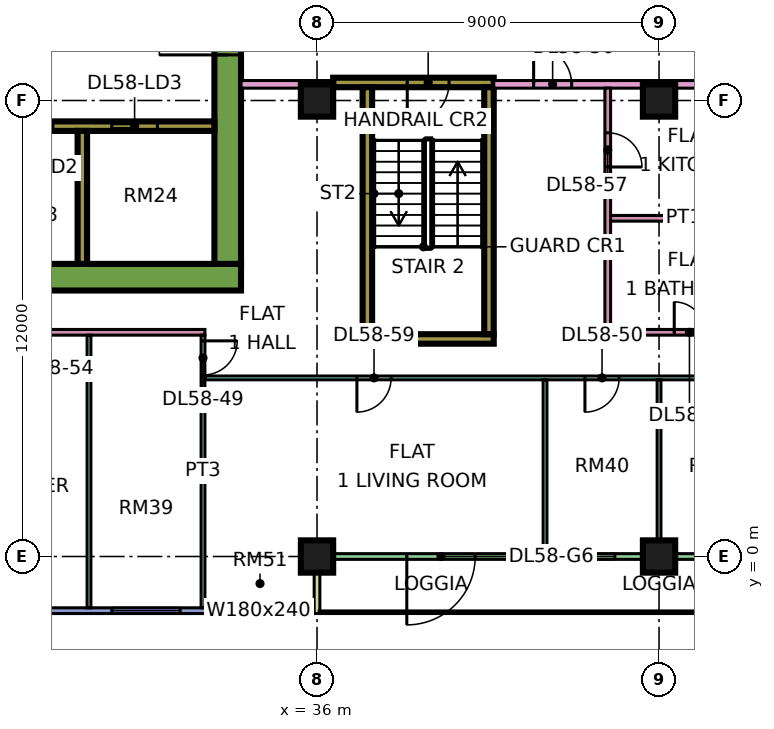
"""IFC4 building model, lengths in metres.
Left out: names, types, materials, properties, quantities, classifications, styles, units other than length and angle.
Written with IfcOpenShell. Run it as: python <this file> out.ifc"""

import sys

from ifc_helpers import new_model, si_unit, direction, frame, frame_2d, origin, origin_2d, place, context, subcontext, project, spatial, rectangle, extrude, element, fill, save


model = new_model("IFC4")
c1 = context("Model", 3, precision=1e-05, world=origin(), true_north=direction((0.0, 1.0)))
c2 = subcontext(c1, "Body", "Model", "MODEL_VIEW")
j1 = project(units=[si_unit("LENGTHUNIT", "METRE"), si_unit("PLANEANGLEUNIT", "RADIAN")], contexts=[c1])
p1 = place(None, origin())
s1 = spatial("IfcSite", under=j1, at=p1, CompositionType="ELEMENT")
p2 = place(p1, origin())
s2 = spatial("IfcBuilding", under=s1, at=p2, CompositionType="ELEMENT")
p3 = place(p2, frame((0.0, 0.0, 245.4)))
s3 = spatial("IfcBuildingStorey", under=s2, at=p3, CompositionType="ELEMENT", Elevation=245.4)
for number, where, z_axis, x_axis in (
    (1, (36.0, 0.0, 0.0), (0.0, 0.0, 1.0), (1.0, 0.0, 0.0)),
    (2, (36.0, 12.0, 0.0), (0.0, 0.0, 1.0), (1.0, 0.0, 0.0)),
    (3, (45.0, 0.0, 0.0), (0.0, 0.0, 1.0), (1.0, 0.0, 0.0)),
    (4, (45.0, 12.0, 0.0), (0.0, 0.0, 1.0), (1.0, 0.0, 0.0)),
):
    element("IfcColumn", number, at=place(p3, frame(where, z_axis=z_axis, x_axis=x_axis)), inside=s3, PredefinedType="COLUMN", context=c2, shape_type="SweptSolid", body=[
        extrude(rectangle(XDim=0.85, YDim=0.85, at=origin_2d()), origin(), (0.0, 0.0, 1.0), 3.75),
    ])
p4 = place(p3, frame((9.0, 7.35, 0.0), z_axis=(0.0, 0.0, 1.0), x_axis=(1.0, 0.0, 0.0)))
e5 = element("IfcWall", 5, at=p4, inside=s3, PredefinedType="SHEAR", context=c2, shape_type="SweptSolid", body=[
    extrude(rectangle(XDim=25.0, YDim=0.7, at=frame_2d((12.5, 0.0))), origin(), (0.0, 0.0, 1.0), 3.75),
])
p5 = place(p3, frame((33.65, 7.7, 0.0), z_axis=(0.0, 0.0, 1.0), x_axis=(0.0, 1.0, 0.0)))
e6 = element("IfcWall", 6, at=p5, inside=s3, PredefinedType="SHEAR", context=c2, shape_type="SweptSolid", body=[
    extrude(rectangle(XDim=11.6, YDim=0.7, at=frame_2d((5.8, 0.0))), origin(), (0.0, 0.0, 1.0), 3.75),
])
p6 = place(p5, frame((5.5, 0.0, 0.0)))
e7 = element("IfcOpeningElement", 7, at=p6, cuts=e6, PredefinedType="OPENING", context=c2, shape_type="SweptSolid", body=[
    extrude(rectangle(XDim=1.8, YDim=2.4, at=frame_2d((0.9, 1.2))), frame((0.0, 0.36, 0.0), z_axis=(0.0, -1.0, 0.0), x_axis=(1.0, 0.0, 0.0)), (0.0, 0.0, 1.0), 0.72),
])
p7 = place(p3, frame((13.45, 11.325, 0.0), z_axis=(0.0, 0.0, 1.0), x_axis=(1.0, 0.0, 0.0)))
e8 = element("IfcWall", 8, at=p7, inside=s3, PredefinedType="SHEAR", context=c2, shape_type="SweptSolid", body=[
    extrude(rectangle(XDim=19.85, YDim=0.25, at=frame_2d((9.925, 0.0))), origin(), (0.0, 0.0, 1.0), 3.75),
])
p8 = place(p7, frame((11.65, 0.0, 0.0)))
e9 = element("IfcOpeningElement", 9, at=p8, cuts=e8, PredefinedType="OPENING", context=c2, shape_type="SweptSolid", body=[
    extrude(rectangle(XDim=1.2, YDim=2.2, at=frame_2d((0.6, 1.1))), frame((0.0, 0.135, 0.0), z_axis=(0.0, -1.0, 0.0), x_axis=(1.0, 0.0, 0.0)), (0.0, 0.0, 1.0), 0.27),
])
p9 = place(p7, frame((14.4, 0.0, 0.0)))
e10 = element("IfcOpeningElement", 10, at=p9, cuts=e8, PredefinedType="OPENING", context=c2, shape_type="SweptSolid", body=[
    extrude(rectangle(XDim=1.2, YDim=2.2, at=frame_2d((0.6, 1.1))), frame((0.0, 0.135, 0.0), z_axis=(0.0, -1.0, 0.0), x_axis=(1.0, 0.0, 0.0)), (0.0, 0.0, 1.0), 0.27),
])
p10 = place(p7, frame((17.15, 0.0, 0.0)))
e11 = element("IfcOpeningElement", 11, at=p10, cuts=e8, PredefinedType="OPENING", context=c2, shape_type="SweptSolid", body=[
    extrude(rectangle(XDim=1.2, YDim=2.2, at=frame_2d((0.6, 1.1))), frame((0.0, 0.135, 0.0), z_axis=(0.0, -1.0, 0.0), x_axis=(1.0, 0.0, 0.0)), (0.0, 0.0, 1.0), 0.27),
])
p11 = place(p7, frame((1.55, 0.0, 0.0)))
e12 = element("IfcOpeningElement", 12, at=p11, cuts=e8, PredefinedType="OPENING", context=c2, shape_type="SweptSolid", body=[
    extrude(rectangle(XDim=0.9, YDim=2.1, at=frame_2d((0.45, 1.05))), frame((0.0, 0.135, 0.0), z_axis=(0.0, -1.0, 0.0), x_axis=(1.0, 0.0, 0.0)), (0.0, 0.0, 1.0), 0.27),
])
p12 = place(p7, frame((6.925, 0.0, 0.0)))
e13 = element("IfcOpeningElement", 13, at=p12, cuts=e8, PredefinedType="OPENING", context=c2, shape_type="SweptSolid", body=[
    extrude(rectangle(XDim=0.9, YDim=2.1, at=frame_2d((0.45, 1.05))), frame((0.0, 0.135, 0.0), z_axis=(0.0, -1.0, 0.0), x_axis=(1.0, 0.0, 0.0)), (0.0, 0.0, 1.0), 0.27),
])
p13 = place(p3, frame((29.825, 7.7, 0.0), z_axis=(0.0, 0.0, 1.0), x_axis=(0.0, 1.0, 0.0)))
e14 = element("IfcWall", 14, at=p13, inside=s3, PredefinedType="SHEAR", context=c2, shape_type="SweptSolid", body=[
    extrude(rectangle(XDim=3.5, YDim=0.25, at=frame_2d((1.75, 0.0))), origin(), (0.0, 0.0, 1.0), 3.75),
])
p14 = place(p3, frame((37.2, 5.725, 0.0), z_axis=(0.0, 0.0, 1.0), x_axis=(1.0, 0.0, 0.0)))
e15 = element("IfcWall", 15, at=p14, inside=s3, PredefinedType="SHEAR", context=c2, shape_type="SweptSolid", body=[
    extrude(rectangle(XDim=3.45, YDim=0.25, at=frame_2d((1.725, 0.0))), origin(), (0.0, 0.0, 1.0), 3.75),
])
p15 = place(p3, frame((36.425, 12.475, 0.0), z_axis=(0.0, 0.0, 1.0), x_axis=(1.0, 0.0, 0.0)))
e16 = element("IfcWall", 16, at=p15, inside=s3, PredefinedType="SHEAR", context=c2, shape_type="SweptSolid", body=[
    extrude(rectangle(XDim=4.225, YDim=0.25, at=frame_2d((2.112, 0.0))), origin(), (0.0, 0.0, 1.0), 3.75),
])
p16 = place(p15, frame((1.95, 0.0, 0.0)))
e17 = element("IfcOpeningElement", 17, at=p16, cuts=e16, PredefinedType="OPENING", context=c2, shape_type="SweptSolid", body=[
    extrude(rectangle(XDim=1.1, YDim=2.2, at=frame_2d((0.55, 1.1))), frame((0.0, 0.135, 0.0), z_axis=(0.0, -1.0, 0.0), x_axis=(1.0, 0.0, 0.0)), (0.0, 0.0, 1.0), 0.27),
])
for number, where, z_axis, x_axis in (
    (18, (37.325, 5.85, 0.0), (0.0, 0.0, 1.0), (0.0, 1.0, 0.0)),
    (19, (40.525, 5.85, 0.0), (0.0, 0.0, 1.0), (0.0, 1.0, 0.0)),
):
    element("IfcWall", number, at=place(p3, frame(where, z_axis=z_axis, x_axis=x_axis)), inside=s3, PredefinedType="SHEAR", context=c2, shape_type="SweptSolid", body=[
        extrude(rectangle(XDim=6.5, YDim=0.25, at=frame_2d((3.25, 0.0))), origin(), (0.0, 0.0, 1.0), 3.75),
    ])
p17 = place(p3, frame((24.075, -1.425, 0.0), z_axis=(0.0, 0.0, 1.0), x_axis=(1.0, 0.0, 0.0)))
e20 = element("IfcWall", 20, at=p17, inside=s3, PredefinedType="SOLIDWALL", context=c2, shape_type="SweptSolid", body=[
    extrude(rectangle(XDim=11.85, YDim=0.15, at=frame_2d((5.925, 0.0))), origin(), (0.0, 0.0, 1.0), 3.35),
])
p18 = place(p17, frame((1.462, 0.0, 0.45)))
e21 = element("IfcOpeningElement", 21, at=p18, cuts=e20, PredefinedType="OPENING", context=c2, shape_type="SweptSolid", body=[
    extrude(rectangle(XDim=3.0, YDim=2.4, at=frame_2d((1.5, 1.2))), frame((0.0, 0.085, 0.0), z_axis=(0.0, -1.0, 0.0), x_axis=(1.0, 0.0, 0.0)), (0.0, 0.0, 1.0), 0.17),
])
p19 = place(p17, frame((6.525, 0.0, 0.45)))
e22 = element("IfcOpeningElement", 22, at=p19, cuts=e20, PredefinedType="OPENING", context=c2, shape_type="SweptSolid", body=[
    extrude(rectangle(XDim=1.8, YDim=2.4, at=frame_2d((0.9, 1.2))), frame((0.0, 0.085, 0.0), z_axis=(0.0, -1.0, 0.0), x_axis=(1.0, 0.0, 0.0)), (0.0, 0.0, 1.0), 0.17),
])
p20 = place(p17, frame((9.488, 0.0, 0.45)))
e23 = element("IfcOpeningElement", 23, at=p20, cuts=e20, PredefinedType="OPENING", context=c2, shape_type="SweptSolid", body=[
    extrude(rectangle(XDim=1.8, YDim=2.4, at=frame_2d((0.9, 1.2))), frame((0.0, 0.085, 0.0), z_axis=(0.0, -1.0, 0.0), x_axis=(1.0, 0.0, 0.0)), (0.0, 0.0, 1.0), 0.17),
])
p21 = place(p3, frame((36.075, 0.0, 0.0), z_axis=(0.0, 0.0, 1.0), x_axis=(1.0, 0.0, 0.0)))
e24 = element("IfcWall", 24, at=p21, inside=s3, PredefinedType="SOLIDWALL", context=c2, shape_type="SweptSolid", body=[
    extrude(rectangle(XDim=11.85, YDim=0.15, at=frame_2d((5.925, 0.0))), origin(), (0.0, 0.0, 1.0), 3.35),
])
p22 = place(p21, frame((2.288, 0.0, 0.0)))
e25 = element("IfcOpeningElement", 25, at=p22, cuts=e24, PredefinedType="OPENING", context=c2, shape_type="SweptSolid", body=[
    extrude(rectangle(XDim=1.8, YDim=2.4, at=frame_2d((0.9, 1.2))), frame((0.0, 0.085, 0.0), z_axis=(0.0, -1.0, 0.0), x_axis=(1.0, 0.0, 0.0)), (0.0, 0.0, 1.0), 0.17),
])
p23 = place(p21, frame((6.562, 0.0, 0.45)))
e26 = element("IfcOpeningElement", 26, at=p23, cuts=e24, PredefinedType="OPENING", context=c2, shape_type="SweptSolid", body=[
    extrude(rectangle(XDim=1.2, YDim=2.4, at=frame_2d((0.6, 1.2))), frame((0.0, 0.085, 0.0), z_axis=(0.0, -1.0, 0.0), x_axis=(1.0, 0.0, 0.0)), (0.0, 0.0, 1.0), 0.17),
])
p24 = place(p21, frame((10.05, 0.0, 0.45)))
e27 = element("IfcOpeningElement", 27, at=p24, cuts=e24, PredefinedType="OPENING", context=c2, shape_type="SweptSolid", body=[
    extrude(rectangle(XDim=1.2, YDim=2.4, at=frame_2d((0.6, 1.2))), frame((0.0, 0.085, 0.0), z_axis=(0.0, -1.0, 0.0), x_axis=(1.0, 0.0, 0.0)), (0.0, 0.0, 1.0), 0.17),
])
p25 = place(p3, frame((36.0, -1.5, 0.0), z_axis=(0.0, 0.0, 1.0), x_axis=(0.0, 1.0, 0.0)))
e28 = element("IfcWall", 28, at=p25, inside=s3, PredefinedType="SOLIDWALL", context=c2, shape_type="SweptSolid", body=[
    extrude(rectangle(XDim=1.5, YDim=0.15, at=frame_2d((0.75, 0.0))), origin(), (0.0, 0.0, 1.0), 3.35),
])
p26 = place(p3, frame((11.95, 5.9, 0.0), z_axis=(0.0, 0.0, 1.0), x_axis=(1.0, 0.0, 0.0)))
e29 = element("IfcWall", 29, at=p26, inside=s3, PredefinedType="PARTITIONING", context=c2, shape_type="SweptSolid", body=[
    extrude(rectangle(XDim=21.1, YDim=0.15, at=frame_2d((10.55, 0.0))), origin(), (0.0, 0.0, 1.0), 3.35),
])
p27 = place(p26, frame((10.1, 0.0, 0.0)))
e30 = element("IfcOpeningElement", 30, at=p27, cuts=e29, PredefinedType="OPENING", context=c2, shape_type="SweptSolid", body=[
    extrude(rectangle(XDim=0.9, YDim=2.1, at=frame_2d((0.45, 1.05))), frame((0.0, 0.085, 0.0), z_axis=(0.0, -1.0, 0.0), x_axis=(1.0, 0.0, 0.0)), (0.0, 0.0, 1.0), 0.17),
])
p28 = place(p26, frame((16.1, 0.0, 0.0)))
e31 = element("IfcOpeningElement", 31, at=p28, cuts=e29, PredefinedType="OPENING", context=c2, shape_type="SweptSolid", body=[
    extrude(rectangle(XDim=0.9, YDim=2.1, at=frame_2d((0.45, 1.05))), frame((0.0, 0.085, 0.0), z_axis=(0.0, -1.0, 0.0), x_axis=(1.0, 0.0, 0.0)), (0.0, 0.0, 1.0), 0.17),
])
p29 = place(p26, frame((4.1, 0.0, 0.0)))
e32 = element("IfcOpeningElement", 32, at=p29, cuts=e29, PredefinedType="OPENING", context=c2, shape_type="SweptSolid", body=[
    extrude(rectangle(XDim=0.9, YDim=2.1, at=frame_2d((0.45, 1.05))), frame((0.0, 0.085, 0.0), z_axis=(0.0, -1.0, 0.0), x_axis=(1.0, 0.0, 0.0)), (0.0, 0.0, 1.0), 0.17),
])
p30 = place(p3, frame((30.0, -1.351, 0.0), z_axis=(0.0, 0.0, 1.0), x_axis=(0.0, 1.0, 0.0)))
e33 = element("IfcWall", 33, at=p30, inside=s3, PredefinedType="PARTITIONING", context=c2, shape_type="SweptSolid", body=[
    extrude(rectangle(XDim=7.176, YDim=0.1, at=frame_2d((3.588, 0.0))), origin(), (0.0, 0.0, 1.0), 3.35),
])
p31 = place(p3, frame((33.0, -1.35, 0.0), z_axis=(0.0, 0.0, 1.0), x_axis=(0.0, 1.0, 0.0)))
e34 = element("IfcWall", 34, at=p31, inside=s3, PredefinedType="PARTITIONING", context=c2, shape_type="SweptSolid", body=[
    extrude(rectangle(XDim=7.175, YDim=0.1, at=frame_2d((3.587, 0.0))), origin(), (0.0, 0.0, 1.0), 3.35),
])
p32 = place(p31, frame((6.125, 0.0, 0.0)))
e35 = element("IfcOpeningElement", 35, at=p32, cuts=e34, PredefinedType="OPENING", context=c2, shape_type="SweptSolid", body=[
    extrude(rectangle(XDim=0.9, YDim=2.1, at=frame_2d((0.45, 1.05))), frame((0.0, 0.06, 0.0), z_axis=(0.0, -1.0, 0.0), x_axis=(1.0, 0.0, 0.0)), (0.0, 0.0, 1.0), 0.12),
])
p33 = place(p3, frame((33.05, 4.7, 0.0), z_axis=(0.0, 0.0, 1.0), x_axis=(1.0, 0.0, 0.0)))
e36 = element("IfcWall", 36, at=p33, inside=s3, PredefinedType="PARTITIONING", context=c2, shape_type="SweptSolid", body=[
    extrude(rectangle(XDim=14.85, YDim=0.1, at=frame_2d((7.425, 0.0))), origin(), (0.0, 0.0, 1.0), 3.35),
])
p34 = place(p33, frame((10.0, 0.0, 0.0)))
e37 = element("IfcOpeningElement", 37, at=p34, cuts=e36, PredefinedType="OPENING", context=c2, shape_type="SweptSolid", body=[
    extrude(rectangle(XDim=0.9, YDim=2.1, at=frame_2d((0.45, 1.05))), frame((0.0, 0.06, 0.0), z_axis=(0.0, -1.0, 0.0), x_axis=(1.0, 0.0, 0.0)), (0.0, 0.0, 1.0), 0.12),
])
p35 = place(p33, frame((13.0, 0.0, 0.0)))
e38 = element("IfcOpeningElement", 38, at=p35, cuts=e36, PredefinedType="OPENING", context=c2, shape_type="SweptSolid", body=[
    extrude(rectangle(XDim=0.9, YDim=2.1, at=frame_2d((0.45, 1.05))), frame((0.0, 0.06, 0.0), z_axis=(0.0, -1.0, 0.0), x_axis=(1.0, 0.0, 0.0)), (0.0, 0.0, 1.0), 0.12),
])
p36 = place(p33, frame((4.0, 0.0, 0.0)))
e39 = element("IfcOpeningElement", 39, at=p36, cuts=e36, PredefinedType="OPENING", context=c2, shape_type="SweptSolid", body=[
    extrude(rectangle(XDim=0.9, YDim=2.1, at=frame_2d((0.45, 1.05))), frame((0.0, 0.06, 0.0), z_axis=(0.0, -1.0, 0.0), x_axis=(1.0, 0.0, 0.0)), (0.0, 0.0, 1.0), 0.12),
])
p37 = place(p3, frame((34.0, 12.425, 0.0), z_axis=(0.0, 0.0, 1.0), x_axis=(1.0, 0.0, 0.0)))
e40 = element("IfcWall", 40, at=p37, inside=s3, PredefinedType="PARTITIONING", context=c2, shape_type="SweptSolid", body=[
    extrude(rectangle(XDim=2.426, YDim=0.2, at=frame_2d((1.213, 0.0))), origin(), (0.0, 0.0, 1.0), 3.35),
])
p38 = place(p3, frame((40.65, 12.425, 0.0), z_axis=(0.0, 0.0, 1.0), x_axis=(1.0, 0.0, 0.0)))
e41 = element("IfcWall", 41, at=p38, inside=s3, PredefinedType="PARTITIONING", context=c2, shape_type="SweptSolid", body=[
    extrude(rectangle(XDim=22.276, YDim=0.2, at=frame_2d((11.138, 0.0))), origin(), (0.0, 0.0, 1.0), 3.35),
])
p39 = place(p38, frame((8.7, 0.0, 0.0)))
e42 = element("IfcOpeningElement", 42, at=p39, cuts=e41, PredefinedType="OPENING", context=c2, shape_type="SweptSolid", body=[
    extrude(rectangle(XDim=1.0, YDim=2.1, at=frame_2d((0.5, 1.05))), frame((0.0, 0.11, 0.0), z_axis=(0.0, -1.0, 0.0), x_axis=(1.0, 0.0, 0.0)), (0.0, 0.0, 1.0), 0.22),
])
p40 = place(p38, frame((1.05, 0.0, 0.0)))
e43 = element("IfcOpeningElement", 43, at=p40, cuts=e41, PredefinedType="OPENING", context=c2, shape_type="SweptSolid", body=[
    extrude(rectangle(XDim=1.0, YDim=2.1, at=frame_2d((0.5, 1.05))), frame((0.0, 0.11, 0.0), z_axis=(0.0, -1.0, 0.0), x_axis=(1.0, 0.0, 0.0)), (0.0, 0.0, 1.0), 0.22),
])
p41 = place(p3, frame((42.0, 0.074, 0.0), z_axis=(0.0, 0.0, 1.0), x_axis=(0.0, 1.0, 0.0)))
e44 = element("IfcWall", 44, at=p41, inside=s3, PredefinedType="PARTITIONING", context=c2, shape_type="SweptSolid", body=[
    extrude(rectangle(XDim=4.576, YDim=0.1, at=frame_2d((2.288, 0.0))), origin(), (0.0, 0.0, 1.0), 3.35),
])
p42 = place(p3, frame((43.65, 5.825, 0.0), z_axis=(0.0, 0.0, 1.0), x_axis=(0.0, 1.0, 0.0)))
e45 = element("IfcWall", 45, at=p42, inside=s3, PredefinedType="PARTITIONING", context=c2, shape_type="SweptSolid", body=[
    extrude(rectangle(XDim=6.5, YDim=0.15, at=frame_2d((3.25, 0.0))), origin(), (0.0, 0.0, 1.0), 3.35),
])
p43 = place(p42, frame((4.425, 0.0, 0.0)))
e46 = element("IfcOpeningElement", 46, at=p43, cuts=e45, PredefinedType="OPENING", context=c2, shape_type="SweptSolid", body=[
    extrude(rectangle(XDim=0.9, YDim=2.1, at=frame_2d((0.45, 1.05))), frame((0.0, 0.085, 0.0), z_axis=(0.0, -1.0, 0.0), x_axis=(1.0, 0.0, 0.0)), (0.0, 0.0, 1.0), 0.17),
])
p44 = place(p3, frame((43.725, 5.9, 0.0), z_axis=(0.0, 0.0, 1.0), x_axis=(1.0, 0.0, 0.0)))
e47 = element("IfcWall", 47, at=p44, inside=s3, PredefinedType="PARTITIONING", context=c2, shape_type="SweptSolid", body=[
    extrude(rectangle(XDim=4.175, YDim=0.15, at=frame_2d((2.087, 0.0))), origin(), (0.0, 0.0, 1.0), 3.35),
])
p45 = place(p44, frame((1.675, 0.0, 0.0)))
e48 = element("IfcOpeningElement", 48, at=p45, cuts=e47, PredefinedType="OPENING", context=c2, shape_type="SweptSolid", body=[
    extrude(rectangle(XDim=0.8, YDim=2.1, at=frame_2d((0.4, 1.05))), frame((0.0, 0.085, 0.0), z_axis=(0.0, -1.0, 0.0), x_axis=(1.0, 0.0, 0.0)), (0.0, 0.0, 1.0), 0.17),
])
p46 = place(p3, frame((43.725, 8.9, 0.0), z_axis=(0.0, 0.0, 1.0), x_axis=(1.0, 0.0, 0.0)))
e49 = element("IfcWall", 49, at=p46, inside=s3, PredefinedType="PARTITIONING", context=c2, shape_type="SweptSolid", body=[
    extrude(rectangle(XDim=4.175, YDim=0.15, at=frame_2d((2.087, 0.0))), origin(), (0.0, 0.0, 1.0), 3.35),
])
p47 = place(p3, frame((45.0, 0.074, 0.0), z_axis=(0.0, 0.0, 1.0), x_axis=(0.0, 1.0, 0.0)))
e50 = element("IfcWall", 50, at=p47, inside=s3, PredefinedType="PARTITIONING", context=c2, shape_type="SweptSolid", body=[
    extrude(rectangle(XDim=4.576, YDim=0.1, at=frame_2d((2.288, 0.0))), origin(), (0.0, 0.0, 1.0), 3.35),
])
p48 = place(p19, origin())
e51 = element("IfcWindow", 51, at=p48, inside=s3, PartitioningType="SINGLE_PANEL", PredefinedType="WINDOW", context=c2, shape_type="SweptSolid", body=[
    extrude(rectangle(XDim=1.8, YDim=2.4, at=frame_2d((0.9, 1.2))), frame((0.0, 0.03, 0.0), z_axis=(0.0, -1.0, 0.0), x_axis=(1.0, 0.0, 0.0)), (0.0, 0.0, 1.0), 0.06),
])
fill(e22, e51)
p49 = place(p20, origin())
e52 = element("IfcWindow", 52, at=p49, inside=s3, PartitioningType="SINGLE_PANEL", PredefinedType="WINDOW", context=c2, shape_type="SweptSolid", body=[
    extrude(rectangle(XDim=1.8, YDim=2.4, at=frame_2d((0.9, 1.2))), frame((0.0, 0.03, 0.0), z_axis=(0.0, -1.0, 0.0), x_axis=(1.0, 0.0, 0.0)), (0.0, 0.0, 1.0), 0.06),
])
fill(e23, e52)
p50 = place(p22, frame((1.8, 0.0, 0.0), z_axis=(0.0, 0.0, 1.0), x_axis=(-1.0, 0.0, 0.0)))
e53 = element("IfcDoor", 53, at=p50, inside=s3, OperationType="DOUBLE_DOOR_SINGLE_SWING", PredefinedType="DOOR", context=c2, shape_type="SweptSolid", body=[
    extrude(rectangle(XDim=1.8, YDim=2.4, at=frame_2d((0.9, 1.2))), frame((0.0, 0.025, 0.0), z_axis=(0.0, -1.0, 0.0), x_axis=(1.0, 0.0, 0.0)), (0.0, 0.0, 1.0), 0.05),
])
fill(e25, e53)
p51 = place(p23, origin())
e54 = element("IfcWindow", 54, at=p51, inside=s3, PartitioningType="SINGLE_PANEL", PredefinedType="WINDOW", context=c2, shape_type="SweptSolid", body=[
    extrude(rectangle(XDim=1.2, YDim=2.4, at=frame_2d((0.6, 1.2))), frame((0.0, 0.03, 0.0), z_axis=(0.0, -1.0, 0.0), x_axis=(1.0, 0.0, 0.0)), (0.0, 0.0, 1.0), 0.06),
])
fill(e26, e54)
p52 = place(p9, origin())
e55 = element("IfcDoor", 55, at=p52, inside=s3, OperationType="DOUBLE_DOOR_SLIDING", PredefinedType="DOOR", context=c2, shape_type="SweptSolid", body=[
    extrude(rectangle(XDim=1.2, YDim=2.2, at=frame_2d((0.6, 1.1))), frame((0.0, 0.025, 0.0), z_axis=(0.0, -1.0, 0.0), x_axis=(1.0, 0.0, 0.0)), (0.0, 0.0, 1.0), 0.05),
])
fill(e10, e55)
p53 = place(p10, origin())
e56 = element("IfcDoor", 56, at=p53, inside=s3, OperationType="DOUBLE_DOOR_SLIDING", PredefinedType="DOOR", context=c2, shape_type="SweptSolid", body=[
    extrude(rectangle(XDim=1.2, YDim=2.2, at=frame_2d((0.6, 1.1))), frame((0.0, 0.025, 0.0), z_axis=(0.0, -1.0, 0.0), x_axis=(1.0, 0.0, 0.0)), (0.0, 0.0, 1.0), 0.05),
])
fill(e11, e56)
p54 = place(p6, origin())
e57 = element("IfcDoor", 57, at=p54, inside=s3, OperationType="DOUBLE_DOOR_SINGLE_SWING", PredefinedType="DOOR", context=c2, shape_type="SweptSolid", body=[
    extrude(rectangle(XDim=1.8, YDim=2.4, at=frame_2d((0.9, 1.2))), frame((0.0, 0.025, 0.0), z_axis=(0.0, -1.0, 0.0), x_axis=(1.0, 0.0, 0.0)), (0.0, 0.0, 1.0), 0.05),
])
fill(e7, e57)
p55 = place(p16, frame((1.1, 0.0, 0.0), z_axis=(0.0, 0.0, 1.0), x_axis=(-1.0, 0.0, 0.0)))
e58 = element("IfcDoor", 58, at=p55, inside=s3, OperationType="SINGLE_SWING_LEFT", PredefinedType="DOOR", context=c2, shape_type="SweptSolid", body=[
    extrude(rectangle(XDim=1.1, YDim=2.2, at=frame_2d((0.55, 1.1))), frame((0.0, 0.025, 0.0), z_axis=(0.0, -1.0, 0.0), x_axis=(1.0, 0.0, 0.0)), (0.0, 0.0, 1.0), 0.05),
])
fill(e17, e58)
p56 = place(p45, origin())
e59 = element("IfcDoor", 59, at=p56, inside=s3, OperationType="SINGLE_SWING_LEFT", PredefinedType="DOOR", context=c2, shape_type="SweptSolid", body=[
    extrude(rectangle(XDim=0.8, YDim=2.1, at=frame_2d((0.4, 1.05))), frame((0.0, 0.025, 0.0), z_axis=(0.0, -1.0, 0.0), x_axis=(1.0, 0.0, 0.0)), (0.0, 0.0, 1.0), 0.05),
])
fill(e48, e59)
p57 = place(p32, origin())
e60 = element("IfcDoor", 60, at=p57, inside=s3, OperationType="SINGLE_SWING_RIGHT", PredefinedType="DOOR", context=c2, shape_type="SweptSolid", body=[
    extrude(rectangle(XDim=0.9, YDim=2.1, at=frame_2d((0.45, 1.05))), frame((0.0, 0.025, 0.0), z_axis=(0.0, -1.0, 0.0), x_axis=(1.0, 0.0, 0.0)), (0.0, 0.0, 1.0), 0.05),
])
fill(e35, e60)
p58 = place(p34, frame((0.9, 0.0, 0.0), z_axis=(0.0, 0.0, 1.0), x_axis=(-1.0, 0.0, 0.0)))
e61 = element("IfcDoor", 61, at=p58, inside=s3, OperationType="SINGLE_SWING_LEFT", PredefinedType="DOOR", context=c2, shape_type="SweptSolid", body=[
    extrude(rectangle(XDim=0.9, YDim=2.1, at=frame_2d((0.45, 1.05))), frame((0.0, 0.025, 0.0), z_axis=(0.0, -1.0, 0.0), x_axis=(1.0, 0.0, 0.0)), (0.0, 0.0, 1.0), 0.05),
])
fill(e37, e61)
p59 = place(p40, origin())
e62 = element("IfcDoor", 62, at=p59, inside=s3, OperationType="SINGLE_SWING_LEFT", PredefinedType="DOOR", context=c2, shape_type="SweptSolid", body=[
    extrude(rectangle(XDim=1.0, YDim=2.1, at=frame_2d((0.5, 1.05))), frame((0.0, 0.025, 0.0), z_axis=(0.0, -1.0, 0.0), x_axis=(1.0, 0.0, 0.0)), (0.0, 0.0, 1.0), 0.05),
])
fill(e43, e62)
p60 = place(p43, frame((0.9, 0.0, 0.0), z_axis=(0.0, 0.0, 1.0), x_axis=(-1.0, 0.0, 0.0)))
e63 = element("IfcDoor", 63, at=p60, inside=s3, OperationType="SINGLE_SWING_LEFT", PredefinedType="DOOR", context=c2, shape_type="SweptSolid", body=[
    extrude(rectangle(XDim=0.9, YDim=2.1, at=frame_2d((0.45, 1.05))), frame((0.0, 0.025, 0.0), z_axis=(0.0, -1.0, 0.0), x_axis=(1.0, 0.0, 0.0)), (0.0, 0.0, 1.0), 0.05),
])
fill(e46, e63)
p61 = place(p36, frame((0.9, 0.0, 0.0), z_axis=(0.0, 0.0, 1.0), x_axis=(-1.0, 0.0, 0.0)))
e64 = element("IfcDoor", 64, at=p61, inside=s3, OperationType="SINGLE_SWING_LEFT", PredefinedType="DOOR", context=c2, shape_type="SweptSolid", body=[
    extrude(rectangle(XDim=0.9, YDim=2.1, at=frame_2d((0.45, 1.05))), frame((0.0, 0.025, 0.0), z_axis=(0.0, -1.0, 0.0), x_axis=(1.0, 0.0, 0.0)), (0.0, 0.0, 1.0), 0.05),
])
fill(e39, e64)
save(model, sys.argv[1])
